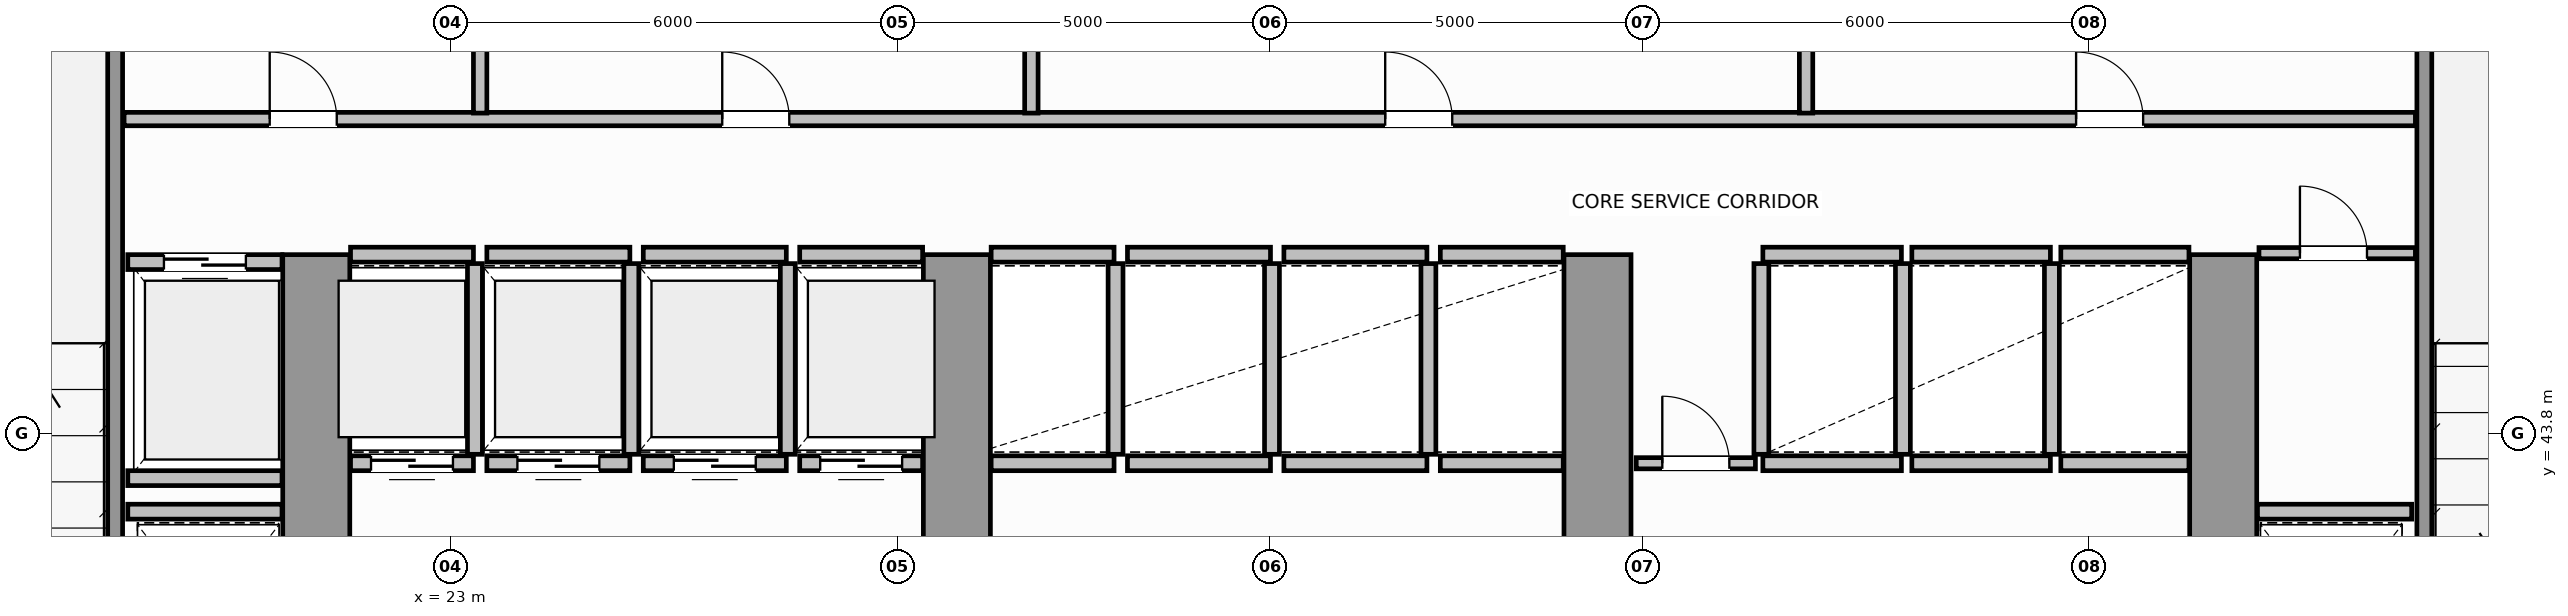
"""IFC4 building model, lengths in metres.
Left out: names, types, materials, properties, quantities, classifications, styles, units other than length and angle.
Written with IfcOpenShell. Run it as: python <this file> out.ifc"""

import sys

from ifc_helpers import new_model, si_unit, direction, frame, frame_2d, origin, place, context, subcontext, project, spatial, rectangle, extrude, source, transform, mapped, element, fill, save


model = new_model("IFC4")
c1 = context("Model", 3, precision=1e-05, world=origin(), true_north=direction((0.0, 1.0)))
c2 = subcontext(c1, "Body", "Model", "MODEL_VIEW")
j1 = project(units=[si_unit("LENGTHUNIT", "METRE"), si_unit("PLANEANGLEUNIT", "RADIAN")], contexts=[c1])
p1 = place(None, origin())
s1 = spatial("IfcSite", under=j1, at=p1, CompositionType="ELEMENT")
p2 = place(p1, origin())
s2 = spatial("IfcBuilding", under=s1, at=p2, CompositionType="ELEMENT")
p3 = place(p2, frame((0.0, 0.0, 22.6)))
s3 = spatial("IfcBuildingStorey", under=s2, at=p3, CompositionType="ELEMENT", Elevation=22.6)
for number, where, z_axis, x_axis in (
    (1, (21.2, 36.97, 0.0), (0.0, 0.0, 1.0), (0.0, 1.0, 0.0)),
    (2, (29.8, 36.97, 0.0), (0.0, 0.0, 1.0), (0.0, 1.0, 0.0)),
    (3, (38.4, 36.97, 0.0), (0.0, 0.0, 1.0), (0.0, 1.0, 0.0)),
    (4, (46.8, 36.97, 0.0), (0.0, 0.0, 1.0), (0.0, 1.0, 0.0)),
):
    element("IfcWall", number, at=place(p3, frame(where, z_axis=z_axis, x_axis=x_axis)), inside=s3, PredefinedType="SHEAR", context=c2, shape_type="SweptSolid", body=[
        extrude(rectangle(XDim=9.23, YDim=0.9, at=frame_2d((4.615, 0.0))), origin(), (0.0, 0.0, 1.0), 3.8),
    ])
for number, where, z_axis, x_axis in (
    (5, (18.5, 39.96, 0.0), (0.0, 0.0, 1.0), (0.0, 1.0, 0.0)),
    (6, (49.5, 39.96, 0.0), (0.0, 0.0, 1.0), (0.0, 1.0, 0.0)),
):
    element("IfcWall", number, at=place(p3, frame(where, z_axis=z_axis, x_axis=x_axis)), inside=s3, PredefinedType="SOLIDWALL", context=c2, shape_type="SweptSolid", body=[
        extrude(rectangle(XDim=9.93, YDim=0.2, at=frame_2d((4.965, 0.0))), origin(), (0.0, 0.0, 1.0), 3.8),
    ])
p4 = place(p3, frame((21.66, 43.4, 0.0), z_axis=(0.0, 0.0, 1.0), x_axis=(1.0, 0.0, 0.0)))
e7 = element("IfcWall", 7, at=p4, inside=s3, PredefinedType="SOLIDWALL", context=c2, shape_type="SweptSolid", body=[
    extrude(rectangle(XDim=1.65, YDim=0.2, at=frame_2d((0.825, 0.0))), origin(), (0.0, 0.0, 1.0), 3.58),
])
p5 = place(p4, frame((0.275, 0.0, 0.0)))
e8 = element("IfcOpeningElement", 8, at=p5, cuts=e7, PredefinedType="OPENING", context=c2, shape_type="SweptSolid", body=[
    extrude(rectangle(XDim=1.1, YDim=2.15, at=frame_2d((0.55, 1.075))), frame((0.0, 0.11, 0.0), z_axis=(0.0, -1.0, 0.0), x_axis=(1.0, 0.0, 0.0)), (0.0, 0.0, 1.0), 0.22),
])
p6 = place(p3, frame((21.66, 46.2, 0.0), z_axis=(0.0, 0.0, 1.0), x_axis=(1.0, 0.0, 0.0)))
e9 = element("IfcWall", 9, at=p6, inside=s3, PredefinedType="SOLIDWALL", context=c2, shape_type="SweptSolid", body=[
    extrude(rectangle(XDim=1.65, YDim=0.2, at=frame_2d((0.825, 0.0))), origin(), (0.0, 0.0, 1.0), 3.58),
])
p7 = place(p3, frame((23.33, 43.52, 0.0), z_axis=(0.0, 0.0, 1.0), x_axis=(0.0, 1.0, 0.0)))
e10 = element("IfcWall", 10, at=p7, inside=s3, PredefinedType="SOLIDWALL", context=c2, shape_type="SweptSolid", body=[
    extrude(rectangle(XDim=2.56, YDim=0.2, at=frame_2d((1.28, 0.0))), origin(), (0.0, 0.0, 1.0), 3.58),
])
p8 = place(p3, frame((23.49, 43.4, 0.0), z_axis=(0.0, 0.0, 1.0), x_axis=(1.0, 0.0, 0.0)))
e11 = element("IfcWall", 11, at=p8, inside=s3, PredefinedType="SOLIDWALL", context=c2, shape_type="SweptSolid", body=[
    extrude(rectangle(XDim=1.92, YDim=0.2, at=frame_2d((0.96, 0.0))), origin(), (0.0, 0.0, 1.0), 3.58),
])
p9 = place(p8, frame((0.41, 0.0, 0.0)))
e12 = element("IfcOpeningElement", 12, at=p9, cuts=e11, PredefinedType="OPENING", context=c2, shape_type="SweptSolid", body=[
    extrude(rectangle(XDim=1.1, YDim=2.15, at=frame_2d((0.55, 1.075))), frame((0.0, 0.11, 0.0), z_axis=(0.0, -1.0, 0.0), x_axis=(1.0, 0.0, 0.0)), (0.0, 0.0, 1.0), 0.22),
])
p10 = place(p3, frame((23.49, 46.2, 0.0), z_axis=(0.0, 0.0, 1.0), x_axis=(1.0, 0.0, 0.0)))
e13 = element("IfcWall", 13, at=p10, inside=s3, PredefinedType="SOLIDWALL", context=c2, shape_type="SweptSolid", body=[
    extrude(rectangle(XDim=1.92, YDim=0.2, at=frame_2d((0.96, 0.0))), origin(), (0.0, 0.0, 1.0), 3.58),
])
p11 = place(p3, frame((25.43, 43.52, 0.0), z_axis=(0.0, 0.0, 1.0), x_axis=(0.0, 1.0, 0.0)))
e14 = element("IfcWall", 14, at=p11, inside=s3, PredefinedType="SOLIDWALL", context=c2, shape_type="SweptSolid", body=[
    extrude(rectangle(XDim=2.56, YDim=0.2, at=frame_2d((1.28, 0.0))), origin(), (0.0, 0.0, 1.0), 3.58),
])
p12 = place(p3, frame((25.59, 43.4, 0.0), z_axis=(0.0, 0.0, 1.0), x_axis=(1.0, 0.0, 0.0)))
e15 = element("IfcWall", 15, at=p12, inside=s3, PredefinedType="SOLIDWALL", context=c2, shape_type="SweptSolid", body=[
    extrude(rectangle(XDim=1.92, YDim=0.2, at=frame_2d((0.96, 0.0))), origin(), (0.0, 0.0, 1.0), 3.58),
])
p13 = place(p12, frame((0.41, 0.0, 0.0)))
e16 = element("IfcOpeningElement", 16, at=p13, cuts=e15, PredefinedType="OPENING", context=c2, shape_type="SweptSolid", body=[
    extrude(rectangle(XDim=1.1, YDim=2.15, at=frame_2d((0.55, 1.075))), frame((0.0, 0.11, 0.0), z_axis=(0.0, -1.0, 0.0), x_axis=(1.0, 0.0, 0.0)), (0.0, 0.0, 1.0), 0.22),
])
p14 = place(p3, frame((25.59, 46.2, 0.0), z_axis=(0.0, 0.0, 1.0), x_axis=(1.0, 0.0, 0.0)))
e17 = element("IfcWall", 17, at=p14, inside=s3, PredefinedType="SOLIDWALL", context=c2, shape_type="SweptSolid", body=[
    extrude(rectangle(XDim=1.92, YDim=0.2, at=frame_2d((0.96, 0.0))), origin(), (0.0, 0.0, 1.0), 3.58),
])
p15 = place(p3, frame((27.53, 43.52, 0.0), z_axis=(0.0, 0.0, 1.0), x_axis=(0.0, 1.0, 0.0)))
e18 = element("IfcWall", 18, at=p15, inside=s3, PredefinedType="SOLIDWALL", context=c2, shape_type="SweptSolid", body=[
    extrude(rectangle(XDim=2.56, YDim=0.2, at=frame_2d((1.28, 0.0))), origin(), (0.0, 0.0, 1.0), 3.58),
])
p16 = place(p3, frame((27.69, 43.4, 0.0), z_axis=(0.0, 0.0, 1.0), x_axis=(1.0, 0.0, 0.0)))
e19 = element("IfcWall", 19, at=p16, inside=s3, PredefinedType="SOLIDWALL", context=c2, shape_type="SweptSolid", body=[
    extrude(rectangle(XDim=1.65, YDim=0.2, at=frame_2d((0.825, 0.0))), origin(), (0.0, 0.0, 1.0), 3.58),
])
p17 = place(p16, frame((0.275, 0.0, 0.0)))
e20 = element("IfcOpeningElement", 20, at=p17, cuts=e19, PredefinedType="OPENING", context=c2, shape_type="SweptSolid", body=[
    extrude(rectangle(XDim=1.1, YDim=2.15, at=frame_2d((0.55, 1.075))), frame((0.0, 0.11, 0.0), z_axis=(0.0, -1.0, 0.0), x_axis=(1.0, 0.0, 0.0)), (0.0, 0.0, 1.0), 0.22),
])
p18 = place(p3, frame((27.69, 46.2, 0.0), z_axis=(0.0, 0.0, 1.0), x_axis=(1.0, 0.0, 0.0)))
e21 = element("IfcWall", 21, at=p18, inside=s3, PredefinedType="SOLIDWALL", context=c2, shape_type="SweptSolid", body=[
    extrude(rectangle(XDim=1.65, YDim=0.2, at=frame_2d((0.825, 0.0))), origin(), (0.0, 0.0, 1.0), 3.58),
])
for number, where, z_axis, x_axis in (
    (22, (30.26, 43.4, 0.0), (0.0, 0.0, 1.0), (1.0, 0.0, 0.0)),
    (23, (30.26, 46.2, 0.0), (0.0, 0.0, 1.0), (1.0, 0.0, 0.0)),
):
    element("IfcWall", number, at=place(p3, frame(where, z_axis=z_axis, x_axis=x_axis)), inside=s3, PredefinedType="SOLIDWALL", context=c2, shape_type="SweptSolid", body=[
        extrude(rectangle(XDim=1.65, YDim=0.2, at=frame_2d((0.825, 0.0))), origin(), (0.0, 0.0, 1.0), 3.58),
    ])
p19 = place(p3, frame((31.93, 43.52, 0.0), z_axis=(0.0, 0.0, 1.0), x_axis=(0.0, 1.0, 0.0)))
e24 = element("IfcWall", 24, at=p19, inside=s3, PredefinedType="SOLIDWALL", context=c2, shape_type="SweptSolid", body=[
    extrude(rectangle(XDim=2.56, YDim=0.2, at=frame_2d((1.28, 0.0))), origin(), (0.0, 0.0, 1.0), 3.58),
])
for number, where, z_axis, x_axis in (
    (25, (32.09, 43.4, 0.0), (0.0, 0.0, 1.0), (1.0, 0.0, 0.0)),
    (26, (32.09, 46.2, 0.0), (0.0, 0.0, 1.0), (1.0, 0.0, 0.0)),
):
    element("IfcWall", number, at=place(p3, frame(where, z_axis=z_axis, x_axis=x_axis)), inside=s3, PredefinedType="SOLIDWALL", context=c2, shape_type="SweptSolid", body=[
        extrude(rectangle(XDim=1.92, YDim=0.2, at=frame_2d((0.96, 0.0))), origin(), (0.0, 0.0, 1.0), 3.58),
    ])
p20 = place(p3, frame((34.03, 43.52, 0.0), z_axis=(0.0, 0.0, 1.0), x_axis=(0.0, 1.0, 0.0)))
e27 = element("IfcWall", 27, at=p20, inside=s3, PredefinedType="SOLIDWALL", context=c2, shape_type="SweptSolid", body=[
    extrude(rectangle(XDim=2.56, YDim=0.2, at=frame_2d((1.28, 0.0))), origin(), (0.0, 0.0, 1.0), 3.58),
])
for number, where, z_axis, x_axis in (
    (28, (34.19, 43.4, 0.0), (0.0, 0.0, 1.0), (1.0, 0.0, 0.0)),
    (29, (34.19, 46.2, 0.0), (0.0, 0.0, 1.0), (1.0, 0.0, 0.0)),
):
    element("IfcWall", number, at=place(p3, frame(where, z_axis=z_axis, x_axis=x_axis)), inside=s3, PredefinedType="SOLIDWALL", context=c2, shape_type="SweptSolid", body=[
        extrude(rectangle(XDim=1.92, YDim=0.2, at=frame_2d((0.96, 0.0))), origin(), (0.0, 0.0, 1.0), 3.58),
    ])
p21 = place(p3, frame((36.13, 43.52, 0.0), z_axis=(0.0, 0.0, 1.0), x_axis=(0.0, 1.0, 0.0)))
e30 = element("IfcWall", 30, at=p21, inside=s3, PredefinedType="SOLIDWALL", context=c2, shape_type="SweptSolid", body=[
    extrude(rectangle(XDim=2.56, YDim=0.2, at=frame_2d((1.28, 0.0))), origin(), (0.0, 0.0, 1.0), 3.58),
])
for number, where, z_axis, x_axis in (
    (31, (36.29, 43.4, 0.0), (0.0, 0.0, 1.0), (1.0, 0.0, 0.0)),
    (32, (36.29, 46.2, 0.0), (0.0, 0.0, 1.0), (1.0, 0.0, 0.0)),
):
    element("IfcWall", number, at=place(p3, frame(where, z_axis=z_axis, x_axis=x_axis)), inside=s3, PredefinedType="SOLIDWALL", context=c2, shape_type="SweptSolid", body=[
        extrude(rectangle(XDim=1.65, YDim=0.2, at=frame_2d((0.825, 0.0))), origin(), (0.0, 0.0, 1.0), 3.58),
    ])
for number, where, z_axis, x_axis in (
    (33, (40.62, 43.4, 0.0), (0.0, 0.0, 1.0), (1.0, 0.0, 0.0)),
    (34, (40.62, 46.2, 0.0), (0.0, 0.0, 1.0), (1.0, 0.0, 0.0)),
):
    element("IfcWall", number, at=place(p3, frame(where, z_axis=z_axis, x_axis=x_axis)), inside=s3, PredefinedType="SOLIDWALL", context=c2, shape_type="SweptSolid", body=[
        extrude(rectangle(XDim=1.86, YDim=0.2, at=frame_2d((0.93, 0.0))), origin(), (0.0, 0.0, 1.0), 3.58),
    ])
for number, where, z_axis, x_axis in (
    (35, (40.6, 43.52, 0.0), (0.0, 0.0, 1.0), (0.0, 1.0, 0.0)),
    (36, (42.5, 43.52, 0.0), (0.0, 0.0, 1.0), (0.0, 1.0, 0.0)),
):
    element("IfcWall", number, at=place(p3, frame(where, z_axis=z_axis, x_axis=x_axis)), inside=s3, PredefinedType="SOLIDWALL", context=c2, shape_type="SweptSolid", body=[
        extrude(rectangle(XDim=2.56, YDim=0.2, at=frame_2d((1.28, 0.0))), origin(), (0.0, 0.0, 1.0), 3.58),
    ])
for number, where, z_axis, x_axis in (
    (37, (42.62, 43.4, 0.0), (0.0, 0.0, 1.0), (1.0, 0.0, 0.0)),
    (38, (42.62, 46.2, 0.0), (0.0, 0.0, 1.0), (1.0, 0.0, 0.0)),
):
    element("IfcWall", number, at=place(p3, frame(where, z_axis=z_axis, x_axis=x_axis)), inside=s3, PredefinedType="SOLIDWALL", context=c2, shape_type="SweptSolid", body=[
        extrude(rectangle(XDim=1.86, YDim=0.2, at=frame_2d((0.93, 0.0))), origin(), (0.0, 0.0, 1.0), 3.58),
    ])
p22 = place(p3, frame((44.5, 43.52, 0.0), z_axis=(0.0, 0.0, 1.0), x_axis=(0.0, 1.0, 0.0)))
e39 = element("IfcWall", 39, at=p22, inside=s3, PredefinedType="SOLIDWALL", context=c2, shape_type="SweptSolid", body=[
    extrude(rectangle(XDim=2.56, YDim=0.2, at=frame_2d((1.28, 0.0))), origin(), (0.0, 0.0, 1.0), 3.58),
])
for number, where, z_axis, x_axis in (
    (40, (44.62, 43.4, 0.0), (0.0, 0.0, 1.0), (1.0, 0.0, 0.0)),
    (41, (44.62, 46.2, 0.0), (0.0, 0.0, 1.0), (1.0, 0.0, 0.0)),
):
    element("IfcWall", number, at=place(p3, frame(where, z_axis=z_axis, x_axis=x_axis)), inside=s3, PredefinedType="SOLIDWALL", context=c2, shape_type="SweptSolid", body=[
        extrude(rectangle(XDim=1.72, YDim=0.2, at=frame_2d((0.86, 0.0))), origin(), (0.0, 0.0, 1.0), 3.58),
    ])
p23 = place(p3, frame((18.67, 46.1, 0.0), z_axis=(0.0, 0.0, 1.0), x_axis=(1.0, 0.0, 0.0)))
e42 = element("IfcWall", 42, at=p23, inside=s3, PredefinedType="SOLIDWALL", context=c2, shape_type="SweptSolid", body=[
    extrude(rectangle(XDim=2.07, YDim=0.2, at=frame_2d((1.035, 0.0))), origin(), (0.0, 0.0, 1.0), 3.58),
])
p24 = place(p23, frame((0.485, 0.0, 0.0)))
e43 = element("IfcOpeningElement", 43, at=p24, cuts=e42, PredefinedType="OPENING", context=c2, shape_type="SweptSolid", body=[
    extrude(rectangle(XDim=1.1, YDim=2.15, at=frame_2d((0.55, 1.075))), frame((0.0, 0.11, 0.0), z_axis=(0.0, -1.0, 0.0), x_axis=(1.0, 0.0, 0.0)), (0.0, 0.0, 1.0), 0.22),
])
for number, where, z_axis, x_axis in (
    (44, (18.67, 43.2, 0.0), (0.0, 0.0, 1.0), (1.0, 0.0, 0.0)),
    (45, (18.67, 42.75, 0.0), (0.0, 0.0, 1.0), (1.0, 0.0, 0.0)),
    (46, (47.26, 42.75, 0.0), (0.0, 0.0, 1.0), (1.0, 0.0, 0.0)),
):
    element("IfcWall", number, at=place(p3, frame(where, z_axis=z_axis, x_axis=x_axis)), inside=s3, PredefinedType="SOLIDWALL", context=c2, shape_type="SweptSolid", body=[
        extrude(rectangle(XDim=2.07, YDim=0.2, at=frame_2d((1.035, 0.0))), origin(), (0.0, 0.0, 1.0), 3.58),
    ])
p25 = place(p3, frame((47.28, 46.22, 0.0), z_axis=(0.0, 0.0, 1.0), x_axis=(1.0, 0.0, 0.0)))
e47 = element("IfcWall", 47, at=p25, inside=s3, PredefinedType="PARTITIONING", context=c2, shape_type="SweptSolid", body=[
    extrude(rectangle(XDim=2.1, YDim=0.15, at=frame_2d((1.05, 0.0))), origin(), (0.0, 0.0, 1.0), 3.58),
])
p26 = place(p25, frame((0.55, 0.0, 0.0)))
e48 = element("IfcOpeningElement", 48, at=p26, cuts=e47, PredefinedType="OPENING", context=c2, shape_type="SweptSolid", body=[
    extrude(rectangle(XDim=0.9, YDim=2.1, at=frame_2d((0.45, 1.05))), frame((0.0, 0.085, 0.0), z_axis=(0.0, -1.0, 0.0), x_axis=(1.0, 0.0, 0.0)), (0.0, 0.0, 1.0), 0.17),
])
p27 = place(p3, frame((38.92, 43.4, 0.0), z_axis=(0.0, 0.0, 1.0), x_axis=(1.0, 0.0, 0.0)))
e49 = element("IfcWall", 49, at=p27, inside=s3, PredefinedType="PARTITIONING", context=c2, shape_type="SweptSolid", body=[
    extrude(rectangle(XDim=1.6, YDim=0.15, at=frame_2d((0.8, 0.0))), origin(), (0.0, 0.0, 1.0), 3.58),
])
p28 = place(p27, frame((0.35, 0.0, 0.0)))
e50 = element("IfcOpeningElement", 50, at=p28, cuts=e49, PredefinedType="OPENING", context=c2, shape_type="SweptSolid", body=[
    extrude(rectangle(XDim=0.9, YDim=2.1, at=frame_2d((0.45, 1.05))), frame((0.0, 0.085, 0.0), z_axis=(0.0, -1.0, 0.0), x_axis=(1.0, 0.0, 0.0)), (0.0, 0.0, 1.0), 0.17),
])
p29 = place(p3, frame((18.62, 48.02, 0.0), z_axis=(0.0, 0.0, 1.0), x_axis=(1.0, 0.0, 0.0)))
e51 = element("IfcWall", 51, at=p29, inside=s3, PredefinedType="PLUMBINGWALL", context=c2, shape_type="SweptSolid", body=[
    extrude(rectangle(XDim=30.76, YDim=0.18, at=frame_2d((15.38, 0.0))), origin(), (0.0, 0.0, 1.0), 3.58),
])
p30 = place(p29, frame((1.955, 0.0, 0.0)))
e52 = element("IfcOpeningElement", 52, at=p30, cuts=e51, PredefinedType="OPENING", context=c2, shape_type="SweptSolid", body=[
    extrude(rectangle(XDim=0.9, YDim=2.15, at=frame_2d((0.45, 1.075))), frame((0.0, 0.1, 0.0), z_axis=(0.0, -1.0, 0.0), x_axis=(1.0, 0.0, 0.0)), (0.0, 0.0, 1.0), 0.2),
])
p31 = place(p29, frame((8.03, 0.0, 0.0)))
e53 = element("IfcOpeningElement", 53, at=p31, cuts=e51, PredefinedType="OPENING", context=c2, shape_type="SweptSolid", body=[
    extrude(rectangle(XDim=0.9, YDim=2.15, at=frame_2d((0.45, 1.075))), frame((0.0, 0.1, 0.0), z_axis=(0.0, -1.0, 0.0), x_axis=(1.0, 0.0, 0.0)), (0.0, 0.0, 1.0), 0.2),
])
p32 = place(p29, frame((16.93, 0.0, 0.0)))
e54 = element("IfcOpeningElement", 54, at=p32, cuts=e51, PredefinedType="OPENING", context=c2, shape_type="SweptSolid", body=[
    extrude(rectangle(XDim=0.9, YDim=2.15, at=frame_2d((0.45, 1.075))), frame((0.0, 0.1, 0.0), z_axis=(0.0, -1.0, 0.0), x_axis=(1.0, 0.0, 0.0)), (0.0, 0.0, 1.0), 0.2),
])
p33 = place(p29, frame((26.205, 0.0, 0.0)))
e55 = element("IfcOpeningElement", 55, at=p33, cuts=e51, PredefinedType="OPENING", context=c2, shape_type="SweptSolid", body=[
    extrude(rectangle(XDim=0.9, YDim=2.15, at=frame_2d((0.45, 1.075))), frame((0.0, 0.1, 0.0), z_axis=(0.0, -1.0, 0.0), x_axis=(1.0, 0.0, 0.0)), (0.0, 0.0, 1.0), 0.2),
])
for number, where, z_axis, x_axis in (
    (56, (23.4, 48.1, 0.0), (0.0, 0.0, 1.0), (0.0, 1.0, 0.0)),
    (57, (30.8, 48.1, 0.0), (0.0, 0.0, 1.0), (0.0, 1.0, 0.0)),
    (58, (41.2, 48.1, 0.0), (0.0, 0.0, 1.0), (0.0, 1.0, 0.0)),
):
    element("IfcWall", number, at=place(p3, frame(where, z_axis=z_axis, x_axis=x_axis)), inside=s3, PredefinedType="PLUMBINGWALL", context=c2, shape_type="SweptSolid", body=[
        extrude(rectangle(XDim=1.98, YDim=0.18, at=frame_2d((0.99, 0.0))), origin(), (0.0, 0.0, 1.0), 3.58),
    ])
m1 = source(origin(), c2, "Body", "SweptSolid", [
    extrude(rectangle(XDim=1.1, YDim=2.15, at=frame_2d((0.55, 1.075))), frame((0.0, 0.025, 0.0), z_axis=(0.0, -1.0, 0.0), x_axis=(1.0, 0.0, 0.0)), (0.0, 0.0, 1.0), 0.05),
])
p34 = place(p5, origin())
e59 = element("IfcDoor", 59, at=p34, inside=s3, OperationType="DOUBLE_DOOR_SLIDING", PredefinedType="DOOR", context=c2, shape_type="MappedRepresentation", body=[
    mapped(m1, transform((0.0, 0.0, 0.0), scale=1.0)),
])
fill(e8, e59)
p35 = place(p9, origin())
e60 = element("IfcDoor", 60, at=p35, inside=s3, OperationType="DOUBLE_DOOR_SLIDING", PredefinedType="DOOR", context=c2, shape_type="MappedRepresentation", body=[
    mapped(m1, transform((0.0, 0.0, 0.0), scale=1.0)),
])
fill(e12, e60)
p36 = place(p13, origin())
e61 = element("IfcDoor", 61, at=p36, inside=s3, OperationType="DOUBLE_DOOR_SLIDING", PredefinedType="DOOR", context=c2, shape_type="MappedRepresentation", body=[
    mapped(m1, transform((0.0, 0.0, 0.0), scale=1.0)),
])
fill(e16, e61)
p37 = place(p17, origin())
e62 = element("IfcDoor", 62, at=p37, inside=s3, OperationType="DOUBLE_DOOR_SLIDING", PredefinedType="DOOR", context=c2, shape_type="MappedRepresentation", body=[
    mapped(m1, transform((0.0, 0.0, 0.0), scale=1.0)),
])
fill(e20, e62)
p38 = place(p24, origin())
e63 = element("IfcDoor", 63, at=p38, inside=s3, OperationType="DOUBLE_DOOR_SLIDING", PredefinedType="DOOR", context=c2, shape_type="MappedRepresentation", body=[
    mapped(m1, transform((0.0, 0.0, 0.0), scale=1.0)),
])
fill(e43, e63)
m2 = source(origin(), c2, "Body", "SweptSolid", [
    extrude(rectangle(XDim=0.9, YDim=2.1, at=frame_2d((0.45, 1.05))), frame((0.0, 0.025, 0.0), z_axis=(0.0, -1.0, 0.0), x_axis=(1.0, 0.0, 0.0)), (0.0, 0.0, 1.0), 0.05),
])
p39 = place(p26, origin())
e64 = element("IfcDoor", 64, at=p39, inside=s3, OperationType="SINGLE_SWING_RIGHT", PredefinedType="DOOR", context=c2, shape_type="MappedRepresentation", body=[
    mapped(m2, transform((0.0, 0.0, 0.0), scale=1.0)),
])
fill(e48, e64)
p40 = place(p28, origin())
e65 = element("IfcDoor", 65, at=p40, inside=s3, OperationType="SINGLE_SWING_LEFT", PredefinedType="DOOR", context=c2, shape_type="MappedRepresentation", body=[
    mapped(m2, transform((0.0, 0.0, 0.0), scale=1.0)),
])
fill(e50, e65)
m3 = source(origin(), c2, "Body", "SweptSolid", [
    extrude(rectangle(XDim=0.9, YDim=2.15, at=frame_2d((0.45, 1.075))), frame((0.0, 0.025, 0.0), z_axis=(0.0, -1.0, 0.0), x_axis=(1.0, 0.0, 0.0)), (0.0, 0.0, 1.0), 0.05),
])
p41 = place(p30, origin())
e66 = element("IfcDoor", 66, at=p41, inside=s3, OperationType="SINGLE_SWING_LEFT", PredefinedType="DOOR", context=c2, shape_type="MappedRepresentation", body=[
    mapped(m3, transform((0.0, 0.0, 0.0), scale=1.0)),
])
fill(e52, e66)
p42 = place(p31, origin())
e67 = element("IfcDoor", 67, at=p42, inside=s3, OperationType="SINGLE_SWING_RIGHT", PredefinedType="DOOR", context=c2, shape_type="MappedRepresentation", body=[
    mapped(m3, transform((0.0, 0.0, 0.0), scale=1.0)),
])
fill(e53, e67)
p43 = place(p32, origin())
e68 = element("IfcDoor", 68, at=p43, inside=s3, OperationType="SINGLE_SWING_LEFT", PredefinedType="DOOR", context=c2, shape_type="MappedRepresentation", body=[
    mapped(m3, transform((0.0, 0.0, 0.0), scale=1.0)),
])
fill(e54, e68)
p44 = place(p33, origin())
e69 = element("IfcDoor", 69, at=p44, inside=s3, OperationType="SINGLE_SWING_RIGHT", PredefinedType="DOOR", context=c2, shape_type="MappedRepresentation", body=[
    mapped(m3, transform((0.0, 0.0, 0.0), scale=1.0)),
])
fill(e55, e69)
save(model, sys.argv[1])
